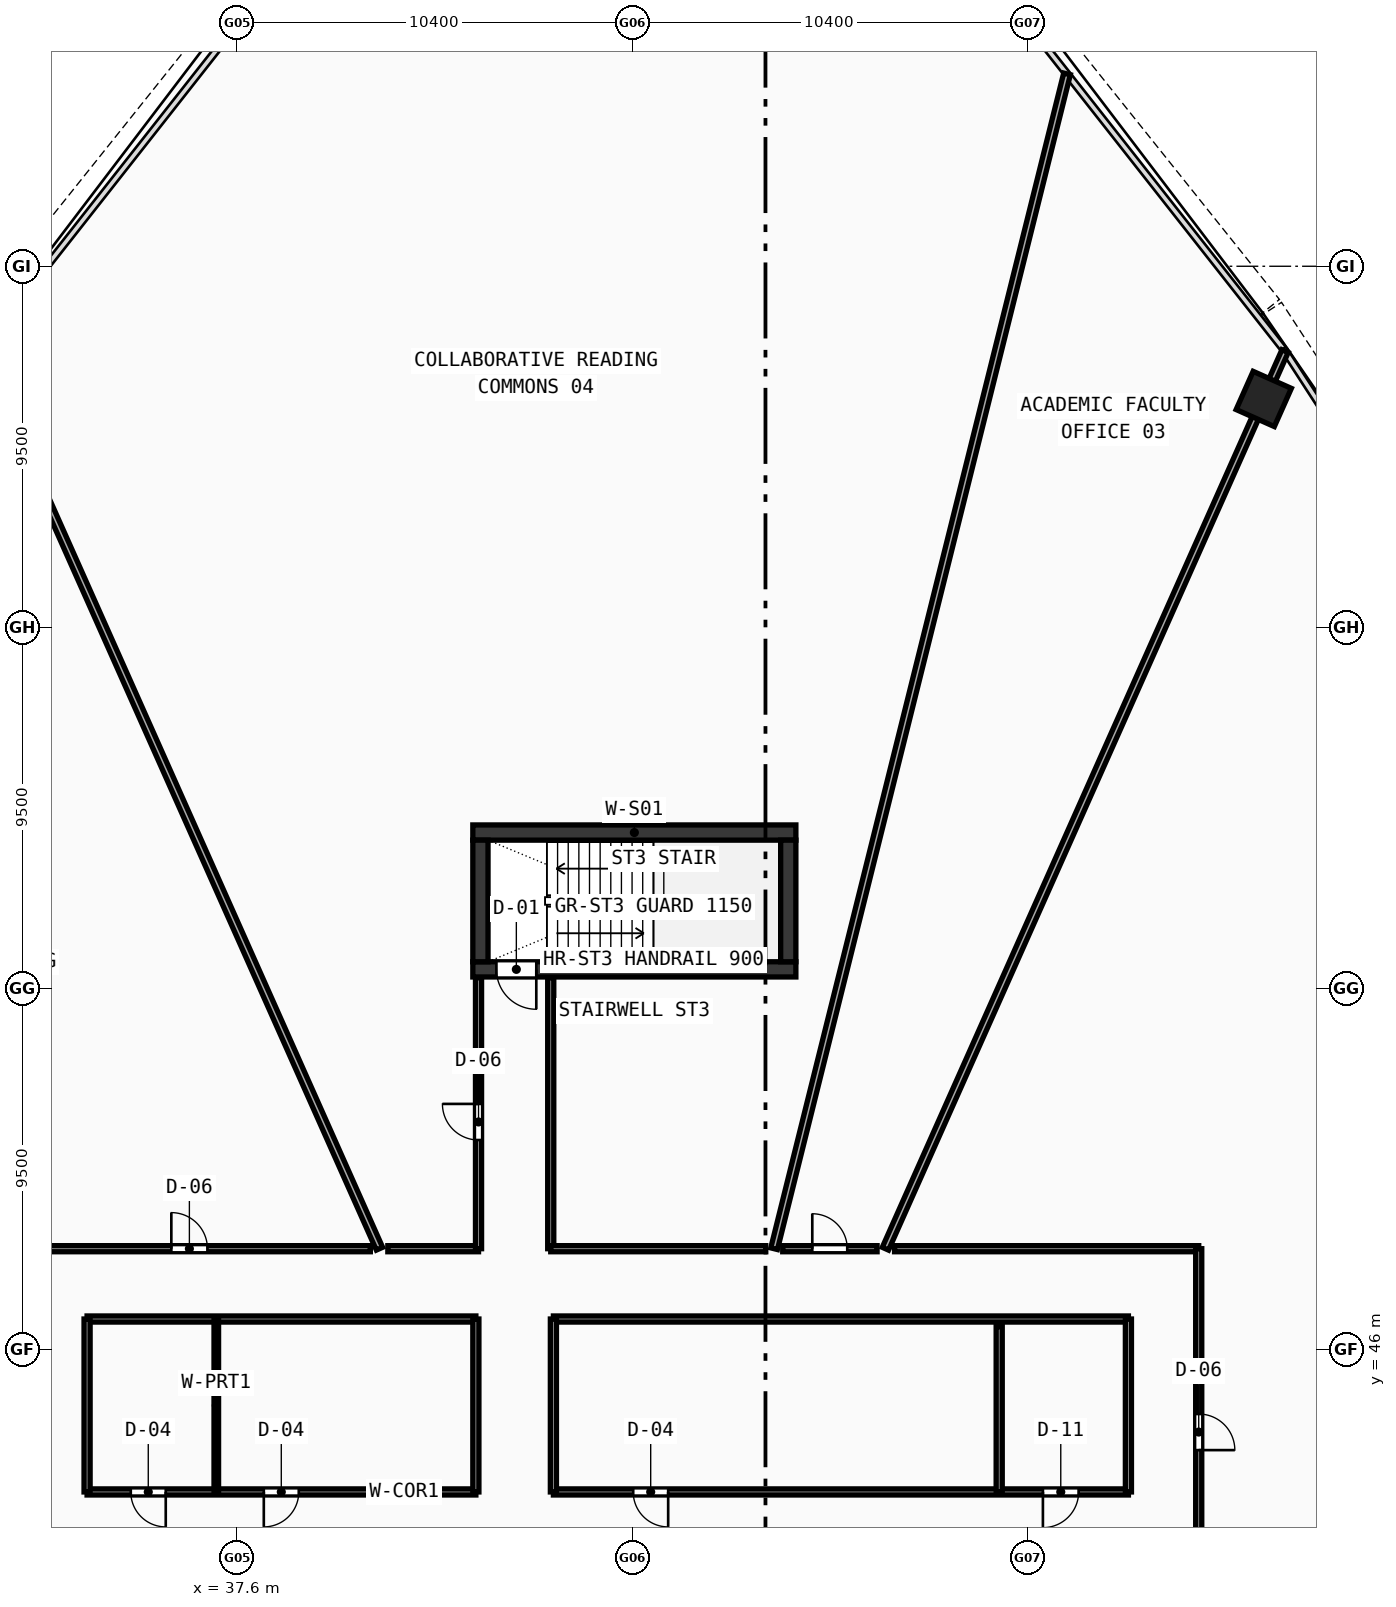
"""IFC4 building model, lengths in metres.
Left out: names, types, materials, properties, quantities, classifications, styles, units other than length and angle.
Written with IfcOpenShell. Run it as: python <this file> out.ifc"""

import sys

from ifc_helpers import new_model, si_unit, direction, frame, frame_2d, origin, origin_with_axes, origin_2d, place, context, subcontext, project, spatial, rectangle, hollow_rectangle, extrude, source, transform, mapped, element, fill, save


model = new_model("IFC4")
c1 = context("Model", 3, precision=1e-05, world=origin(), true_north=direction((0.0, 1.0)))
c2 = subcontext(c1, "Body", "Model", "MODEL_VIEW")
j1 = project(units=[si_unit("LENGTHUNIT", "METRE"), si_unit("PLANEANGLEUNIT", "RADIAN")], contexts=[c1])
p1 = place(None, origin())
s1 = spatial("IfcSite", under=j1, at=p1, CompositionType="ELEMENT")
p2 = place(p1, origin())
s2 = spatial("IfcBuilding", under=s1, at=p2, CompositionType="ELEMENT")
p3 = place(p2, frame((0.0, 0.0, 52.18)))
s3 = spatial("IfcBuildingStorey", under=s2, at=p3, CompositionType="ELEMENT", Elevation=52.18)
p4 = place(p3, frame((43.8, 59.6, 0.0), z_axis=(0.0, 0.0, 1.0), x_axis=(1.0, 0.0, 0.0)))
e1 = element("IfcWall", 1, at=p4, inside=s3, PredefinedType="SHEAR", context=c2, shape_type="SweptSolid", body=[
    extrude(rectangle(XDim=8.5, YDim=0.4, at=frame_2d((4.25, 0.0))), origin(), (0.0, 0.0, 1.0), 3.37),
])
p5 = place(p3, frame((43.8, 56.0, 0.0), z_axis=(0.0, 0.0, 1.0), x_axis=(1.0, 0.0, 0.0)))
e2 = element("IfcWall", 2, at=p5, inside=s3, PredefinedType="SHEAR", context=c2, shape_type="SweptSolid", body=[
    extrude(rectangle(XDim=8.5, YDim=0.4, at=frame_2d((4.25, 0.0))), origin(), (0.0, 0.0, 1.0), 3.37),
])
p6 = place(p5, frame((0.62, 0.0, 0.0)))
e3 = element("IfcOpeningElement", 3, at=p6, cuts=e2, PredefinedType="OPENING", context=c2, shape_type="SweptSolid", body=[
    extrude(rectangle(XDim=1.05, YDim=2.1, at=frame_2d((0.525, 1.05))), frame((0.0, 0.21, 0.0), z_axis=(0.0, -1.0, 0.0), x_axis=(1.0, 0.0, 0.0)), (0.0, 0.0, 1.0), 0.42),
])
for number, where, z_axis, x_axis in (
    (4, (44.0, 56.2, 0.0), (0.0, 0.0, 1.0), (0.0, 1.0, 0.0)),
    (5, (52.1, 56.2, 0.0), (0.0, 0.0, 1.0), (0.0, 1.0, 0.0)),
):
    element("IfcWall", number, at=place(p3, frame(where, z_axis=z_axis, x_axis=x_axis)), inside=s3, PredefinedType="SHEAR", context=c2, shape_type="SweptSolid", body=[
        extrude(rectangle(XDim=3.2, YDim=0.4, at=frame_2d((1.6, 0.0))), origin(), (0.0, 0.0, 1.0), 3.37),
    ])
m1 = source(origin(), c2, "Body", "SweptSolid", [
    extrude(hollow_rectangle(XDim=1.1, YDim=1.1, WallThickness=0.045, at=origin_2d()), origin(), (0.0, 0.0, 1.0), 3.63),
])
p7 = place(p3, frame((64.611, 71.009, -0.26), z_axis=(0.0, 0.0, 1.0), x_axis=(-0.913545457643, 0.406736643076, 0.0)))
e6 = element("IfcColumn", 6, at=p7, inside=s3, PredefinedType="COLUMN", context=c2, shape_type="MappedRepresentation", body=[
    mapped(m1, transform((0.0, 0.0, 0.0), scale=1.0)),
])
p8 = place(p3, frame((33.65, 42.25, 0.0), z_axis=(0.0, 0.0, 1.0), x_axis=(1.0, 0.0, 0.0)))
e7 = element("IfcWall", 7, at=p8, inside=s3, PredefinedType="PARTITIONING", context=c2, shape_type="SweptSolid", body=[
    extrude(rectangle(XDim=10.23, YDim=0.16, at=frame_2d((5.115, 0.0))), origin(), (0.0, 0.0, 1.0), 2.67),
])
p9 = place(p8, frame((1.15, 0.0, 0.0)))
e8 = element("IfcOpeningElement", 8, at=p9, cuts=e7, PredefinedType="OPENING", context=c2, shape_type="SweptSolid", body=[
    extrude(rectangle(XDim=0.92, YDim=2.1, at=frame_2d((0.46, 1.05))), frame((0.0, 0.09, 0.0), z_axis=(0.0, -1.0, 0.0), x_axis=(1.0, 0.0, 0.0)), (0.0, 0.0, 1.0), 0.18),
])
p10 = place(p8, frame((4.65, 0.0, 0.0)))
e9 = element("IfcOpeningElement", 9, at=p10, cuts=e7, PredefinedType="OPENING", context=c2, shape_type="SweptSolid", body=[
    extrude(rectangle(XDim=0.92, YDim=2.1, at=frame_2d((0.46, 1.05))), frame((0.0, 0.09, 0.0), z_axis=(0.0, -1.0, 0.0), x_axis=(1.0, 0.0, 0.0)), (0.0, 0.0, 1.0), 0.18),
])
p11 = place(p3, frame((33.65, 46.8, 0.0), z_axis=(0.0, 0.0, 1.0), x_axis=(1.0, 0.0, 0.0)))
e10 = element("IfcWall", 10, at=p11, inside=s3, PredefinedType="PARTITIONING", context=c2, shape_type="SweptSolid", body=[
    extrude(rectangle(XDim=10.23, YDim=0.16, at=frame_2d((5.115, 0.0))), origin(), (0.0, 0.0, 1.0), 2.67),
])
for number, where, z_axis, x_axis in (
    (11, (33.65, 42.25, 0.0), (0.0, 0.0, 1.0), (0.0, 1.0, 0.0)),
    (12, (43.88, 42.25, 0.0), (0.0, 0.0, 1.0), (0.0, 1.0, 0.0)),
):
    element("IfcWall", number, at=place(p3, frame(where, z_axis=z_axis, x_axis=x_axis)), inside=s3, PredefinedType="PARTITIONING", context=c2, shape_type="SweptSolid", body=[
        extrude(rectangle(XDim=4.55, YDim=0.16, at=frame_2d((2.275, 0.0))), origin(), (0.0, 0.0, 1.0), 2.67),
    ])
p12 = place(p3, frame((37.05, 42.25, 0.0), z_axis=(0.0, 0.0, 1.0), x_axis=(0.0, 1.0, 0.0)))
e13 = element("IfcWall", 13, at=p12, inside=s3, PredefinedType="PARTITIONING", context=c2, shape_type="SweptSolid", body=[
    extrude(rectangle(XDim=4.55, YDim=0.12, at=frame_2d((2.275, 0.0))), origin(), (0.0, 0.0, 1.0), 2.67),
])
p13 = place(p3, frame((45.92, 42.25, 0.0), z_axis=(0.0, 0.0, 1.0), x_axis=(1.0, 0.0, 0.0)))
e14 = element("IfcWall", 14, at=p13, inside=s3, PredefinedType="PARTITIONING", context=c2, shape_type="SweptSolid", body=[
    extrude(rectangle(XDim=15.13, YDim=0.16, at=frame_2d((7.565, 0.0))), origin(), (0.0, 0.0, 1.0), 2.67),
])
p14 = place(p13, frame((2.1, 0.0, 0.0)))
e15 = element("IfcOpeningElement", 15, at=p14, cuts=e14, PredefinedType="OPENING", context=c2, shape_type="SweptSolid", body=[
    extrude(rectangle(XDim=0.92, YDim=2.1, at=frame_2d((0.46, 1.05))), frame((0.0, 0.09, 0.0), z_axis=(0.0, -1.0, 0.0), x_axis=(1.0, 0.0, 0.0)), (0.0, 0.0, 1.0), 0.18),
])
p15 = place(p13, frame((12.88, 0.0, 0.0)))
e16 = element("IfcOpeningElement", 16, at=p15, cuts=e14, PredefinedType="OPENING", context=c2, shape_type="SweptSolid", body=[
    extrude(rectangle(XDim=0.94, YDim=2.1, at=frame_2d((0.47, 1.05))), frame((0.0, 0.09, 0.0), z_axis=(0.0, -1.0, 0.0), x_axis=(1.0, 0.0, 0.0)), (0.0, 0.0, 1.0), 0.18),
])
p16 = place(p3, frame((45.92, 46.8, 0.0), z_axis=(0.0, 0.0, 1.0), x_axis=(1.0, 0.0, 0.0)))
e17 = element("IfcWall", 17, at=p16, inside=s3, PredefinedType="PARTITIONING", context=c2, shape_type="SweptSolid", body=[
    extrude(rectangle(XDim=15.13, YDim=0.16, at=frame_2d((7.565, 0.0))), origin(), (0.0, 0.0, 1.0), 2.67),
])
p17 = place(p3, frame((45.92, 42.25, 0.0), z_axis=(0.0, 0.0, 1.0), x_axis=(0.0, 1.0, 0.0)))
e18 = element("IfcWall", 18, at=p17, inside=s3, PredefinedType="PARTITIONING", context=c2, shape_type="SweptSolid", body=[
    extrude(rectangle(XDim=4.55, YDim=0.16, at=frame_2d((2.275, 0.0))), origin(), (0.0, 0.0, 1.0), 3.37),
])
p18 = place(p3, frame((61.05, 42.25, 0.0), z_axis=(0.0, 0.0, 1.0), x_axis=(0.0, 1.0, 0.0)))
e19 = element("IfcWall", 19, at=p18, inside=s3, PredefinedType="PARTITIONING", context=c2, shape_type="SweptSolid", body=[
    extrude(rectangle(XDim=4.55, YDim=0.16, at=frame_2d((2.275, 0.0))), origin(), (0.0, 0.0, 1.0), 2.67),
])
p19 = place(p3, frame((57.65, 42.25, 0.0), z_axis=(0.0, 0.0, 1.0), x_axis=(0.0, 1.0, 0.0)))
e20 = element("IfcWall", 20, at=p19, inside=s3, PredefinedType="PARTITIONING", context=c2, shape_type="SweptSolid", body=[
    extrude(rectangle(XDim=4.35, YDim=0.16, at=frame_2d((2.175, 0.0))), origin(), (0.0, 0.0, 1.0), 2.67),
])
p20 = place(p3, frame((62.9, 38.541, 0.0), z_axis=(0.0, 0.0, 1.0), x_axis=(0.951053317048, 0.309026840471, 0.0)))
e21 = element("IfcWall", 21, at=p20, inside=s3, PredefinedType="PARTITIONING", context=c2, shape_type="SweptSolid", body=[
    extrude(rectangle(XDim=19.666, YDim=0.18, at=frame_2d((9.833, 0.0))), origin(), (0.0, 0.0, 1.0), 2.67),
])
p21 = place(p3, frame((54.656, 48.65, 0.0), z_axis=(0.0, 0.0, 1.0), x_axis=(0.406729800422, 0.913548504158, 0.0)))
e22 = element("IfcWall", 22, at=p21, inside=s3, PredefinedType="PARTITIONING", context=c2, shape_type="SweptSolid", body=[
    extrude(rectangle(XDim=25.854, YDim=0.18, at=frame_2d((12.927, 0.0))), origin(), (0.0, 0.0, 1.0), 2.67),
])
p22 = place(p3, frame((51.728, 48.65, 0.0), z_axis=(0.0, 0.0, 1.0), x_axis=(0.241918895985, 0.970296474159, 0.0)))
e23 = element("IfcWall", 23, at=p22, inside=s3, PredefinedType="PARTITIONING", context=c2, shape_type="SweptSolid", body=[
    extrude(rectangle(XDim=31.858, YDim=0.18, at=frame_2d((15.929, 0.0))), origin(), (0.0, 0.0, 1.0), 2.67),
])
p23 = place(p3, frame((41.344, 48.65, 0.0), z_axis=(0.0, 0.0, 1.0), x_axis=(-0.406729800422, 0.913548504158, 0.0)))
e24 = element("IfcWall", 24, at=p23, inside=s3, PredefinedType="PARTITIONING", context=c2, shape_type="SweptSolid", body=[
    extrude(rectangle(XDim=25.854, YDim=0.18, at=frame_2d((12.927, 0.0))), origin(), (0.0, 0.0, 1.0), 2.67),
])
p24 = place(p3, frame((31.8, 48.65, 0.0), z_axis=(0.0, 0.0, 1.0), x_axis=(1.0, 0.0, 0.0)))
e25 = element("IfcWall", 25, at=p24, inside=s3, PredefinedType="PARTITIONING", context=c2, shape_type="SweptSolid", body=[
    extrude(rectangle(XDim=9.303, YDim=0.16, at=frame_2d((4.651, 0.0))), origin(), (0.0, 0.0, 1.0), 2.97),
])
p25 = place(p24, frame((4.067, 0.0, 0.0)))
e26 = element("IfcOpeningElement", 26, at=p25, cuts=e25, PredefinedType="OPENING", context=c2, shape_type="SweptSolid", body=[
    extrude(rectangle(XDim=0.95, YDim=2.1, at=frame_2d((0.475, 1.05))), frame((0.0, 0.09, 0.0), z_axis=(0.0, -1.0, 0.0), x_axis=(1.0, 0.0, 0.0)), (0.0, 0.0, 1.0), 0.18),
])
p26 = place(p3, frame((41.564, 48.65, 0.0), z_axis=(0.0, 0.0, 1.0), x_axis=(1.0, 0.0, 0.0)))
e27 = element("IfcWall", 27, at=p26, inside=s3, PredefinedType="PARTITIONING", context=c2, shape_type="SweptSolid", body=[
    extrude(rectangle(XDim=2.386, YDim=0.16, at=frame_2d((1.193, 0.0))), origin(), (0.0, 0.0, 1.0), 2.67),
])
p27 = place(p3, frame((43.95, 48.65, 0.0), z_axis=(0.0, 0.0, 1.0), x_axis=(0.0, 1.0, 0.0)))
e28 = element("IfcWall", 28, at=p27, inside=s3, PredefinedType="PARTITIONING", context=c2, shape_type="SweptSolid", body=[
    extrude(rectangle(XDim=7.13, YDim=0.16, at=frame_2d((3.565, 0.0))), origin(), (0.0, 0.0, 1.0), 2.97),
])
p28 = place(p27, frame((2.86, 0.0, 0.0)))
e29 = element("IfcOpeningElement", 29, at=p28, cuts=e28, PredefinedType="OPENING", context=c2, shape_type="SweptSolid", body=[
    extrude(rectangle(XDim=0.95, YDim=2.1, at=frame_2d((0.475, 1.05))), frame((0.0, 0.09, 0.0), z_axis=(0.0, -1.0, 0.0), x_axis=(1.0, 0.0, 0.0)), (0.0, 0.0, 1.0), 0.18),
])
p29 = place(p3, frame((45.85, 55.78, 0.0), z_axis=(0.0, 0.0, 1.0), x_axis=(0.0, -1.0, 0.0)))
e30 = element("IfcWall", 30, at=p29, inside=s3, PredefinedType="PARTITIONING", context=c2, shape_type="SweptSolid", body=[
    extrude(rectangle(XDim=7.13, YDim=0.16, at=frame_2d((3.565, 0.0))), origin(), (0.0, 0.0, 1.0), 2.97),
])
p30 = place(p3, frame((45.85, 48.65, 0.0), z_axis=(0.0, 0.0, 1.0), x_axis=(1.0, 0.0, 0.0)))
e31 = element("IfcWall", 31, at=p30, inside=s3, PredefinedType="PARTITIONING", context=c2, shape_type="SweptSolid", body=[
    extrude(rectangle(XDim=5.658, YDim=0.16, at=frame_2d((2.829, 0.0))), origin(), (0.0, 0.0, 1.0), 3.37),
])
p31 = place(p3, frame((51.954, 48.65, 0.0), z_axis=(0.0, 0.0, 1.0), x_axis=(1.0, 0.0, 0.0)))
e32 = element("IfcWall", 32, at=p31, inside=s3, PredefinedType="PARTITIONING", context=c2, shape_type="SweptSolid", body=[
    extrude(rectangle(XDim=2.482, YDim=0.16, at=frame_2d((1.241, 0.0))), origin(), (0.0, 0.0, 1.0), 2.67),
])
p32 = place(p31, frame((0.778, 0.0, 0.0)))
e33 = element("IfcOpeningElement", 33, at=p32, cuts=e32, PredefinedType="OPENING", context=c2, shape_type="SweptSolid", body=[
    extrude(rectangle(XDim=0.92, YDim=2.1, at=frame_2d((0.46, 1.05))), frame((0.0, 0.09, 0.0), z_axis=(0.0, -1.0, 0.0), x_axis=(1.0, 0.0, 0.0)), (0.0, 0.0, 1.0), 0.18),
])
p33 = place(p3, frame((54.897, 48.65, 0.0), z_axis=(0.0, 0.0, 1.0), x_axis=(1.0, 0.0, 0.0)))
e34 = element("IfcWall", 34, at=p33, inside=s3, PredefinedType="PARTITIONING", context=c2, shape_type="SweptSolid", body=[
    extrude(rectangle(XDim=8.003, YDim=0.16, at=frame_2d((4.001, 0.0))), origin(), (0.0, 0.0, 1.0), 2.97),
])
p34 = place(p3, frame((62.9, 48.65, 0.0), z_axis=(0.0, 0.0, 1.0), x_axis=(0.0, -1.0, 0.0)))
e35 = element("IfcWall", 35, at=p34, inside=s3, PredefinedType="PARTITIONING", context=c2, shape_type="SweptSolid", body=[
    extrude(rectangle(XDim=9.877, YDim=0.16, at=frame_2d((4.938, 0.0))), origin(), (0.0, 0.0, 1.0), 2.67),
])
p35 = place(p34, frame((4.349, 0.0, 0.0)))
e36 = element("IfcOpeningElement", 36, at=p35, cuts=e35, PredefinedType="OPENING", context=c2, shape_type="SweptSolid", body=[
    extrude(rectangle(XDim=0.95, YDim=2.1, at=frame_2d((0.475, 1.05))), frame((0.0, 0.09, 0.0), z_axis=(0.0, -1.0, 0.0), x_axis=(1.0, 0.0, 0.0)), (0.0, 0.0, 1.0), 0.18),
])
m2 = source(origin(), c2, "Body", "SweptSolid", [
    extrude(rectangle(XDim=1.05, YDim=2.1, at=frame_2d((0.525, 1.05))), frame((0.0, 0.025, 0.0), z_axis=(0.0, -1.0, 0.0), x_axis=(1.0, 0.0, 0.0)), (0.0, 0.0, 1.0), 0.05),
])
p36 = place(p6, frame((1.05, 0.0, 0.0), z_axis=(0.0, 0.0, 1.0), x_axis=(-1.0, 0.0, 0.0)))
e37 = element("IfcDoor", 37, at=p36, inside=s3, OperationType="SINGLE_SWING_LEFT", PredefinedType="DOOR", context=c2, shape_type="MappedRepresentation", body=[
    mapped(m2, transform((0.0, 0.0, 0.0), scale=1.0)),
])
fill(e3, e37)
m3 = source(origin(), c2, "Body", "SweptSolid", [
    extrude(rectangle(XDim=0.92, YDim=2.1, at=frame_2d((0.46, 1.05))), frame((0.0, 0.025, 0.0), z_axis=(0.0, -1.0, 0.0), x_axis=(1.0, 0.0, 0.0)), (0.0, 0.0, 1.0), 0.05),
])
p37 = place(p9, frame((0.92, 0.0, 0.0), z_axis=(0.0, 0.0, 1.0), x_axis=(-1.0, 0.0, 0.0)))
e38 = element("IfcDoor", 38, at=p37, inside=s3, OperationType="SINGLE_SWING_LEFT", PredefinedType="DOOR", context=c2, shape_type="MappedRepresentation", body=[
    mapped(m3, transform((0.0, 0.0, 0.0), scale=1.0)),
])
fill(e8, e38)
p38 = place(p10, frame((0.92, 0.0, 0.0), z_axis=(0.0, 0.0, 1.0), x_axis=(-1.0, 0.0, 0.0)))
e39 = element("IfcDoor", 39, at=p38, inside=s3, OperationType="SINGLE_SWING_RIGHT", PredefinedType="DOOR", context=c2, shape_type="MappedRepresentation", body=[
    mapped(m3, transform((0.0, 0.0, 0.0), scale=1.0)),
])
fill(e9, e39)
p39 = place(p14, frame((0.92, 0.0, 0.0), z_axis=(0.0, 0.0, 1.0), x_axis=(-1.0, 0.0, 0.0)))
e40 = element("IfcDoor", 40, at=p39, inside=s3, OperationType="SINGLE_SWING_LEFT", PredefinedType="DOOR", context=c2, shape_type="MappedRepresentation", body=[
    mapped(m3, transform((0.0, 0.0, 0.0), scale=1.0)),
])
fill(e15, e40)
m4 = source(origin(), c2, "Body", "SweptSolid", [
    extrude(rectangle(XDim=0.94, YDim=2.1, at=frame_2d((0.47, 1.05))), frame((0.0, 0.025, 0.0), z_axis=(0.0, -1.0, 0.0), x_axis=(1.0, 0.0, 0.0)), (0.0, 0.0, 1.0), 0.05),
])
p40 = place(p15, frame((0.94, 0.0, 0.0), z_axis=(0.0, 0.0, 1.0), x_axis=(-1.0, 0.0, 0.0)))
e41 = element("IfcDoor", 41, at=p40, inside=s3, OperationType="SINGLE_SWING_RIGHT", PredefinedType="DOOR", context=c2, shape_type="MappedRepresentation", body=[
    mapped(m4, transform((0.0, 0.0, 0.0), scale=1.0)),
])
fill(e16, e41)
m5 = source(origin(), c2, "Body", "SweptSolid", [
    extrude(rectangle(XDim=0.95, YDim=2.1, at=frame_2d((0.475, 1.05))), frame((0.0, 0.025, 0.0), z_axis=(0.0, -1.0, 0.0), x_axis=(1.0, 0.0, 0.0)), (0.0, 0.0, 1.0), 0.05),
])
p41 = place(p35, origin_with_axes())
e42 = element("IfcDoor", 42, at=p41, inside=s3, OperationType="SINGLE_SWING_RIGHT", PredefinedType="DOOR", context=c2, shape_type="MappedRepresentation", body=[
    mapped(m5, transform((0.0, 0.0, 0.0), scale=1.0)),
])
fill(e36, e42)
p42 = place(p32, origin_with_axes())
e43 = element("IfcDoor", 43, at=p42, inside=s3, OperationType="SINGLE_SWING_LEFT", PredefinedType="DOOR", context=c2, shape_type="MappedRepresentation", body=[
    mapped(m3, transform((0.0, 0.0, 0.0), scale=1.0)),
])
fill(e33, e43)
p43 = place(p28, origin_with_axes())
e44 = element("IfcDoor", 44, at=p43, inside=s3, OperationType="SINGLE_SWING_RIGHT", PredefinedType="DOOR", context=c2, shape_type="MappedRepresentation", body=[
    mapped(m5, transform((0.0, 0.0, 0.0), scale=1.0)),
])
fill(e29, e44)
p44 = place(p25, origin_with_axes())
e45 = element("IfcDoor", 45, at=p44, inside=s3, OperationType="SINGLE_SWING_LEFT", PredefinedType="DOOR", context=c2, shape_type="MappedRepresentation", body=[
    mapped(m5, transform((0.0, 0.0, 0.0), scale=1.0)),
])
fill(e26, e45)
save(model, sys.argv[1])
